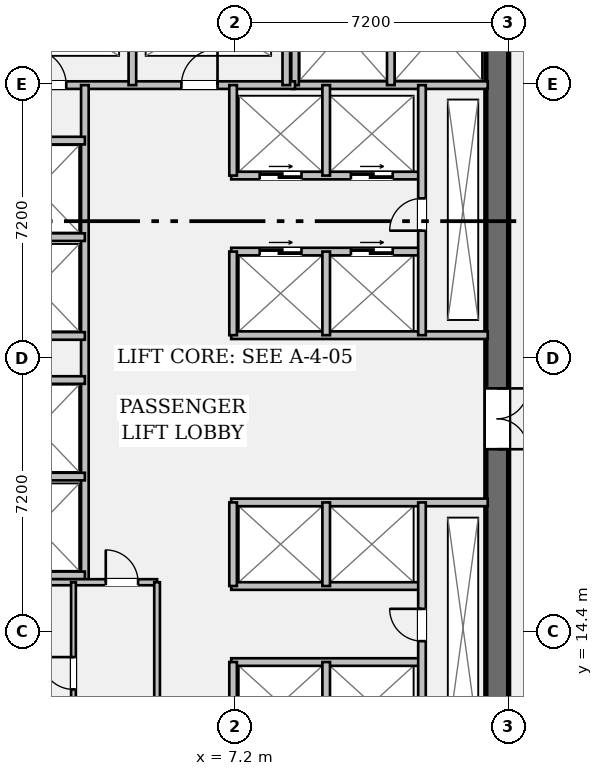
"""IFC4 building model, lengths in metres.
Left out: names, types, materials, properties, quantities, classifications, styles, units other than length and angle.
Written with IfcOpenShell. Run it as: python <this file> out.ifc"""

import sys

from ifc_helpers import new_model, si_unit, direction, frame, frame_2d, origin, place, context, subcontext, project, spatial, rectangle, extrude, element, fill, save


model = new_model("IFC4")
c1 = context("Model", 3, precision=1e-05, world=origin(), true_north=direction((0.0, 1.0)))
c2 = subcontext(c1, "Body", "Model", "MODEL_VIEW")
j1 = project(units=[si_unit("LENGTHUNIT", "METRE"), si_unit("PLANEANGLEUNIT", "RADIAN")], contexts=[c1])
p1 = place(None, origin())
s1 = spatial("IfcSite", under=j1, at=p1, CompositionType="ELEMENT")
p2 = place(p1, origin())
s2 = spatial("IfcBuilding", under=s1, at=p2, CompositionType="ELEMENT")
p3 = place(p2, frame((0.0, 0.0, 92.75)))
s3 = spatial("IfcBuildingStorey", under=s2, at=p3, CompositionType="ELEMENT", Elevation=92.75)
p4 = place(p3, frame((14.1, 35.4, 0.0), z_axis=(0.0, 0.0, 1.0), x_axis=(0.0, -1.0, 0.0)))
e1 = element("IfcWall", 1, at=p4, inside=s3, PredefinedType="SHEAR", context=c2, shape_type="SweptSolid", body=[
    extrude(rectangle(XDim=27.6, YDim=0.6, at=frame_2d((13.8, 0.0))), origin(), (0.0, 0.0, 1.0), 4.6),
])
p5 = place(p4, frame((1.3, 0.0, 0.0)))
e2 = element("IfcOpeningElement", 2, at=p5, cuts=e1, PredefinedType="OPENING", context=c2, shape_type="SweptSolid", body=[
    extrude(rectangle(XDim=1.2, YDim=2.15, at=frame_2d((0.6, 1.075))), frame((0.0, 0.312, 0.0), z_axis=(0.0, -1.0, 0.0), x_axis=(1.0, 0.0, 0.0)), (0.0, 0.0, 1.0), 0.624),
])
p6 = place(p4, frame((25.25, 0.0, 0.0)))
e3 = element("IfcOpeningElement", 3, at=p6, cuts=e1, PredefinedType="OPENING", context=c2, shape_type="SweptSolid", body=[
    extrude(rectangle(XDim=1.2, YDim=2.15, at=frame_2d((0.6, 1.075))), frame((0.0, 0.312, 0.0), z_axis=(0.0, -1.0, 0.0), x_axis=(1.0, 0.0, 0.0)), (0.0, 0.0, 1.0), 0.624),
])
p7 = place(p4, frame((14.6, 0.0, 0.0)))
e4 = element("IfcOpeningElement", 4, at=p7, cuts=e1, PredefinedType="OPENING", context=c2, shape_type="SweptSolid", body=[
    extrude(rectangle(XDim=1.6, YDim=2.2, at=frame_2d((0.8, 1.1))), frame((0.0, 0.312, 0.0), z_axis=(0.0, -1.0, 0.0), x_axis=(1.0, 0.0, 0.0)), (0.0, 0.0, 1.0), 0.624),
])
p8 = place(p3, frame((8.7, 28.78, 0.0), z_axis=(0.0, 0.0, 1.0), x_axis=(1.0, 0.0, 0.0)))
e5 = element("IfcWall", 5, at=p8, inside=s3, PredefinedType="PARTITIONING", context=c2, shape_type="SweptSolid", body=[
    extrude(rectangle(XDim=5.15, YDim=0.2, at=frame_2d((2.575, 0.0))), origin(), (0.0, 0.0, 1.0), 4.6),
])
for number, where, z_axis, x_axis in (
    (6, (8.78, 28.78, 0.0), (0.0, 0.0, 1.0), (0.0, 1.0, 0.0)),
    (7, (11.3, 28.78, 0.0), (0.0, 0.0, 1.0), (0.0, 1.0, 0.0)),
):
    element("IfcWall", number, at=place(p3, frame(where, z_axis=z_axis, x_axis=x_axis)), inside=s3, PredefinedType="PARTITIONING", context=c2, shape_type="SweptSolid", body=[
        extrude(rectangle(XDim=3.1, YDim=0.2, at=frame_2d((1.55, 0.0))), origin(), (0.0, 0.0, 1.0), 4.6),
    ])
p9 = place(p3, frame((0.6, 28.78, 0.0), z_axis=(0.0, 0.0, 1.0), x_axis=(1.0, 0.0, 0.0)))
e8 = element("IfcWall", 8, at=p9, inside=s3, PredefinedType="PARTITIONING", context=c2, shape_type="SweptSolid", body=[
    extrude(rectangle(XDim=8.18, YDim=0.2, at=frame_2d((4.09, 0.0))), origin(), (0.0, 0.0, 1.0), 4.6),
])
p10 = place(p9, frame((1.21, 0.0, 0.0)))
e9 = element("IfcOpeningElement", 9, at=p10, cuts=e8, PredefinedType="OPENING", context=c2, shape_type="SweptSolid", body=[
    extrude(rectangle(XDim=0.95, YDim=2.15, at=frame_2d((0.475, 1.075))), frame((0.0, 0.112, 0.0), z_axis=(0.0, -1.0, 0.0), x_axis=(1.0, 0.0, 0.0)), (0.0, 0.0, 1.0), 0.224),
])
p11 = place(p9, frame((5.19, 0.0, 0.0)))
e10 = element("IfcOpeningElement", 10, at=p11, cuts=e8, PredefinedType="OPENING", context=c2, shape_type="SweptSolid", body=[
    extrude(rectangle(XDim=0.95, YDim=2.15, at=frame_2d((0.475, 1.075))), frame((0.0, 0.112, 0.0), z_axis=(0.0, -1.0, 0.0), x_axis=(1.0, 0.0, 0.0)), (0.0, 0.0, 1.0), 0.224),
])
for number, where, z_axis, x_axis in (
    (11, (4.5, 28.78, 0.0), (0.0, 0.0, 1.0), (0.0, 1.0, 0.0)),
    (12, (8.55, 28.78, 0.0), (0.0, 0.0, 1.0), (0.0, 1.0, 0.0)),
):
    element("IfcWall", number, at=place(p3, frame(where, z_axis=z_axis, x_axis=x_axis)), inside=s3, PredefinedType="PARTITIONING", context=c2, shape_type="SweptSolid", body=[
        extrude(rectangle(XDim=2.94, YDim=0.2, at=frame_2d((1.47, 0.0))), origin(), (0.0, 0.0, 1.0), 4.6),
    ])
p12 = place(p3, frame((3.25, 15.7, 0.0), z_axis=(0.0, 0.0, 1.0), x_axis=(0.0, 1.0, 0.0)))
e13 = element("IfcWall", 13, at=p12, inside=s3, PredefinedType="PARTITIONING", context=c2, shape_type="SweptSolid", body=[
    extrude(rectangle(XDim=13.08, YDim=0.2, at=frame_2d((6.54, 0.0))), origin(), (0.0, 0.0, 1.0), 4.6),
])
for number, where, z_axis, x_axis in (
    (14, (0.6, 15.88, 0.0), (0.0, 0.0, 1.0), (1.0, 0.0, 0.0)),
    (15, (0.6, 18.48, 0.0), (0.0, 0.0, 1.0), (1.0, 0.0, 0.0)),
    (16, (0.6, 22.18, 0.0), (0.0, 0.0, 1.0), (1.0, 0.0, 0.0)),
    (17, (0.6, 24.78, 0.0), (0.0, 0.0, 1.0), (1.0, 0.0, 0.0)),
    (18, (0.6, 21.02, 0.0), (0.0, 0.0, 1.0), (1.0, 0.0, 0.0)),
    (19, (0.6, 27.32, 0.0), (0.0, 0.0, 1.0), (1.0, 0.0, 0.0)),
):
    element("IfcWall", number, at=place(p3, frame(where, z_axis=z_axis, x_axis=x_axis)), inside=s3, PredefinedType="PARTITIONING", context=c2, shape_type="SweptSolid", body=[
        extrude(rectangle(XDim=2.65, YDim=0.2, at=frame_2d((1.325, 0.0))), origin(), (0.0, 0.0, 1.0), 4.6),
    ])
p13 = place(p3, frame((7.1, 22.2, 0.0), z_axis=(0.0, 0.0, 1.0), x_axis=(1.0, 0.0, 0.0)))
e20 = element("IfcWall", 20, at=p13, inside=s3, PredefinedType="PARTITIONING", context=c2, shape_type="SweptSolid", body=[
    extrude(rectangle(XDim=6.75, YDim=0.2, at=frame_2d((3.375, 0.0))), origin(), (0.0, 0.0, 1.0), 4.6),
])
p14 = place(p3, frame((7.1, 24.4, 0.0), z_axis=(0.0, 0.0, 1.0), x_axis=(1.0, 0.0, 0.0)))
e21 = element("IfcWall", 21, at=p14, inside=s3, PredefinedType="PARTITIONING", context=c2, shape_type="SweptSolid", body=[
    extrude(rectangle(XDim=5.02, YDim=0.2, at=frame_2d((2.51, 0.0))), origin(), (0.0, 0.0, 1.0), 4.6),
])
p15 = place(p14, frame((0.75, 0.0, 0.0)))
e22 = element("IfcOpeningElement", 22, at=p15, cuts=e21, PredefinedType="OPENING", context=c2, shape_type="SweptSolid", body=[
    extrude(rectangle(XDim=1.1, YDim=2.2, at=frame_2d((0.55, 1.1))), frame((0.0, 0.112, 0.0), z_axis=(0.0, -1.0, 0.0), x_axis=(1.0, 0.0, 0.0)), (0.0, 0.0, 1.0), 0.224),
])
p16 = place(p14, frame((3.15, 0.0, 0.0)))
e23 = element("IfcOpeningElement", 23, at=p16, cuts=e21, PredefinedType="OPENING", context=c2, shape_type="SweptSolid", body=[
    extrude(rectangle(XDim=1.1, YDim=2.2, at=frame_2d((0.55, 1.1))), frame((0.0, 0.112, 0.0), z_axis=(0.0, -1.0, 0.0), x_axis=(1.0, 0.0, 0.0)), (0.0, 0.0, 1.0), 0.224),
])
p17 = place(p3, frame((7.1, 26.4, 0.0), z_axis=(0.0, 0.0, 1.0), x_axis=(1.0, 0.0, 0.0)))
e24 = element("IfcWall", 24, at=p17, inside=s3, PredefinedType="PARTITIONING", context=c2, shape_type="SweptSolid", body=[
    extrude(rectangle(XDim=5.02, YDim=0.2, at=frame_2d((2.51, 0.0))), origin(), (0.0, 0.0, 1.0), 4.6),
])
p18 = place(p17, frame((0.75, 0.0, 0.0)))
e25 = element("IfcOpeningElement", 25, at=p18, cuts=e24, PredefinedType="OPENING", context=c2, shape_type="SweptSolid", body=[
    extrude(rectangle(XDim=1.1, YDim=2.2, at=frame_2d((0.55, 1.1))), frame((0.0, 0.112, 0.0), z_axis=(0.0, -1.0, 0.0), x_axis=(1.0, 0.0, 0.0)), (0.0, 0.0, 1.0), 0.224),
])
p19 = place(p17, frame((3.15, 0.0, 0.0)))
e26 = element("IfcOpeningElement", 26, at=p19, cuts=e24, PredefinedType="OPENING", context=c2, shape_type="SweptSolid", body=[
    extrude(rectangle(XDim=1.1, YDim=2.2, at=frame_2d((0.55, 1.1))), frame((0.0, 0.112, 0.0), z_axis=(0.0, -1.0, 0.0), x_axis=(1.0, 0.0, 0.0)), (0.0, 0.0, 1.0), 0.224),
])
p20 = place(p3, frame((7.15, 22.2, 0.0), z_axis=(0.0, 0.0, 1.0), x_axis=(0.0, 1.0, 0.0)))
e27 = element("IfcWall", 27, at=p20, inside=s3, PredefinedType="PARTITIONING", context=c2, shape_type="SweptSolid", body=[
    extrude(rectangle(XDim=2.2, YDim=0.2, at=frame_2d((1.1, 0.0))), origin(), (0.0, 0.0, 1.0), 4.6),
])
p21 = place(p3, frame((7.15, 26.4, 0.0), z_axis=(0.0, 0.0, 1.0), x_axis=(0.0, 1.0, 0.0)))
e28 = element("IfcWall", 28, at=p21, inside=s3, PredefinedType="PARTITIONING", context=c2, shape_type="SweptSolid", body=[
    extrude(rectangle(XDim=2.38, YDim=0.2, at=frame_2d((1.19, 0.0))), origin(), (0.0, 0.0, 1.0), 4.6),
])
p22 = place(p3, frame((9.6, 22.2, 0.0), z_axis=(0.0, 0.0, 1.0), x_axis=(0.0, 1.0, 0.0)))
e29 = element("IfcWall", 29, at=p22, inside=s3, PredefinedType="PARTITIONING", context=c2, shape_type="SweptSolid", body=[
    extrude(rectangle(XDim=2.2, YDim=0.2, at=frame_2d((1.1, 0.0))), origin(), (0.0, 0.0, 1.0), 4.6),
])
p23 = place(p3, frame((9.6, 26.4, 0.0), z_axis=(0.0, 0.0, 1.0), x_axis=(0.0, 1.0, 0.0)))
e30 = element("IfcWall", 30, at=p23, inside=s3, PredefinedType="PARTITIONING", context=c2, shape_type="SweptSolid", body=[
    extrude(rectangle(XDim=2.38, YDim=0.2, at=frame_2d((1.19, 0.0))), origin(), (0.0, 0.0, 1.0), 4.6),
])
p24 = place(p3, frame((12.12, 22.2, 0.0), z_axis=(0.0, 0.0, 1.0), x_axis=(0.0, 1.0, 0.0)))
e31 = element("IfcWall", 31, at=p24, inside=s3, PredefinedType="PARTITIONING", context=c2, shape_type="SweptSolid", body=[
    extrude(rectangle(XDim=6.58, YDim=0.2, at=frame_2d((3.29, 0.0))), origin(), (0.0, 0.0, 1.0), 4.6),
])
p25 = place(p24, frame((2.75, 0.0, 0.0)))
e32 = element("IfcOpeningElement", 32, at=p25, cuts=e31, PredefinedType="OPENING", context=c2, shape_type="SweptSolid", body=[
    extrude(rectangle(XDim=0.85, YDim=2.15, at=frame_2d((0.425, 1.075))), frame((0.0, 0.112, 0.0), z_axis=(0.0, -1.0, 0.0), x_axis=(1.0, 0.0, 0.0)), (0.0, 0.0, 1.0), 0.224),
])
p26 = place(p3, frame((7.1, 17.8, 0.0), z_axis=(0.0, 0.0, 1.0), x_axis=(1.0, 0.0, 0.0)))
e33 = element("IfcWall", 33, at=p26, inside=s3, PredefinedType="PARTITIONING", context=c2, shape_type="SweptSolid", body=[
    extrude(rectangle(XDim=6.75, YDim=0.2, at=frame_2d((3.375, 0.0))), origin(), (0.0, 0.0, 1.0), 4.6),
])
for number, where, z_axis, x_axis in (
    (34, (7.1, 15.6, 0.0), (0.0, 0.0, 1.0), (1.0, 0.0, 0.0)),
    (35, (7.1, 13.6, 0.0), (0.0, 0.0, 1.0), (1.0, 0.0, 0.0)),
):
    element("IfcWall", number, at=place(p3, frame(where, z_axis=z_axis, x_axis=x_axis)), inside=s3, PredefinedType="PARTITIONING", context=c2, shape_type="SweptSolid", body=[
        extrude(rectangle(XDim=5.02, YDim=0.2, at=frame_2d((2.51, 0.0))), origin(), (0.0, 0.0, 1.0), 4.6),
    ])
p27 = place(p3, frame((7.15, 15.6, 0.0), z_axis=(0.0, 0.0, 1.0), x_axis=(0.0, 1.0, 0.0)))
e36 = element("IfcWall", 36, at=p27, inside=s3, PredefinedType="PARTITIONING", context=c2, shape_type="SweptSolid", body=[
    extrude(rectangle(XDim=2.2, YDim=0.2, at=frame_2d((1.1, 0.0))), origin(), (0.0, 0.0, 1.0), 4.6),
])
p28 = place(p3, frame((7.15, 11.2, 0.0), z_axis=(0.0, 0.0, 1.0), x_axis=(0.0, 1.0, 0.0)))
e37 = element("IfcWall", 37, at=p28, inside=s3, PredefinedType="PARTITIONING", context=c2, shape_type="SweptSolid", body=[
    extrude(rectangle(XDim=2.4, YDim=0.2, at=frame_2d((1.2, 0.0))), origin(), (0.0, 0.0, 1.0), 4.6),
])
p29 = place(p3, frame((9.6, 15.6, 0.0), z_axis=(0.0, 0.0, 1.0), x_axis=(0.0, 1.0, 0.0)))
e38 = element("IfcWall", 38, at=p29, inside=s3, PredefinedType="PARTITIONING", context=c2, shape_type="SweptSolid", body=[
    extrude(rectangle(XDim=2.2, YDim=0.2, at=frame_2d((1.1, 0.0))), origin(), (0.0, 0.0, 1.0), 4.6),
])
p30 = place(p3, frame((9.6, 11.2, 0.0), z_axis=(0.0, 0.0, 1.0), x_axis=(0.0, 1.0, 0.0)))
e39 = element("IfcWall", 39, at=p30, inside=s3, PredefinedType="PARTITIONING", context=c2, shape_type="SweptSolid", body=[
    extrude(rectangle(XDim=2.4, YDim=0.2, at=frame_2d((1.2, 0.0))), origin(), (0.0, 0.0, 1.0), 4.6),
])
p31 = place(p3, frame((12.12, 11.2, 0.0), z_axis=(0.0, 0.0, 1.0), x_axis=(0.0, 1.0, 0.0)))
e40 = element("IfcWall", 40, at=p31, inside=s3, PredefinedType="PARTITIONING", context=c2, shape_type="SweptSolid", body=[
    extrude(rectangle(XDim=6.6, YDim=0.2, at=frame_2d((3.3, 0.0))), origin(), (0.0, 0.0, 1.0), 4.6),
])
p32 = place(p31, frame((2.95, 0.0, 0.0)))
e41 = element("IfcOpeningElement", 41, at=p32, cuts=e40, PredefinedType="OPENING", context=c2, shape_type="SweptSolid", body=[
    extrude(rectangle(XDim=0.85, YDim=2.15, at=frame_2d((0.425, 1.075))), frame((0.0, 0.112, 0.0), z_axis=(0.0, -1.0, 0.0), x_axis=(1.0, 0.0, 0.0)), (0.0, 0.0, 1.0), 0.224),
])
p33 = place(p3, frame((0.6, 15.7, 0.0), z_axis=(0.0, 0.0, 1.0), x_axis=(1.0, 0.0, 0.0)))
e42 = element("IfcWall", 42, at=p33, inside=s3, PredefinedType="PARTITIONING", context=c2, shape_type="SweptSolid", body=[
    extrude(rectangle(XDim=4.55, YDim=0.16, at=frame_2d((2.275, 0.0))), origin(), (0.0, 0.0, 1.0), 4.6),
])
p34 = place(p33, frame((3.2, 0.0, 0.0)))
e43 = element("IfcOpeningElement", 43, at=p34, cuts=e42, PredefinedType="OPENING", context=c2, shape_type="SweptSolid", body=[
    extrude(rectangle(XDim=0.85, YDim=2.15, at=frame_2d((0.425, 1.075))), frame((0.0, 0.092, 0.0), z_axis=(0.0, -1.0, 0.0), x_axis=(1.0, 0.0, 0.0)), (0.0, 0.0, 1.0), 0.184),
])
p35 = place(p3, frame((5.15, 11.28, 0.0), z_axis=(0.0, 0.0, 1.0), x_axis=(0.0, 1.0, 0.0)))
e44 = element("IfcWall", 44, at=p35, inside=s3, PredefinedType="PARTITIONING", context=c2, shape_type="SweptSolid", body=[
    extrude(rectangle(XDim=4.42, YDim=0.15, at=frame_2d((2.21, 0.0))), origin(), (0.0, 0.0, 1.0), 4.6),
])
p36 = place(p3, frame((2.95, 11.28, 0.0), z_axis=(0.0, 0.0, 1.0), x_axis=(0.0, 1.0, 0.0)))
e45 = element("IfcWall", 45, at=p36, inside=s3, PredefinedType="PARTITIONING", context=c2, shape_type="SweptSolid", body=[
    extrude(rectangle(XDim=4.42, YDim=0.125, at=frame_2d((2.21, 0.0))), origin(), (0.0, 0.0, 1.0), 4.6),
])
p37 = place(p36, frame((1.6, 0.0, 0.0)))
e46 = element("IfcOpeningElement", 46, at=p37, cuts=e45, PredefinedType="OPENING", context=c2, shape_type="SweptSolid", body=[
    extrude(rectangle(XDim=0.85, YDim=2.15, at=frame_2d((0.425, 1.075))), frame((0.0, 0.074, 0.0), z_axis=(0.0, -1.0, 0.0), x_axis=(1.0, 0.0, 0.0)), (0.0, 0.0, 1.0), 0.149),
])
p38 = place(p10, origin())
e47 = element("IfcDoor", 47, at=p38, inside=s3, OperationType="SINGLE_SWING_LEFT", PredefinedType="DOOR", context=c2, shape_type="SweptSolid", body=[
    extrude(rectangle(XDim=0.95, YDim=2.15, at=frame_2d((0.475, 1.075))), frame((0.0, 0.025, 0.0), z_axis=(0.0, -1.0, 0.0), x_axis=(1.0, 0.0, 0.0)), (0.0, 0.0, 1.0), 0.05),
])
fill(e9, e47)
p39 = place(p11, origin())
e48 = element("IfcDoor", 48, at=p39, inside=s3, OperationType="SINGLE_SWING_RIGHT", PredefinedType="DOOR", context=c2, shape_type="SweptSolid", body=[
    extrude(rectangle(XDim=0.95, YDim=2.15, at=frame_2d((0.475, 1.075))), frame((0.0, 0.025, 0.0), z_axis=(0.0, -1.0, 0.0), x_axis=(1.0, 0.0, 0.0)), (0.0, 0.0, 1.0), 0.05),
])
fill(e10, e48)
p40 = place(p7, origin())
e49 = element("IfcDoor", 49, at=p40, inside=s3, OperationType="DOUBLE_DOOR_SINGLE_SWING", PredefinedType="DOOR", context=c2, shape_type="SweptSolid", body=[
    extrude(rectangle(XDim=1.6, YDim=2.2, at=frame_2d((0.8, 1.1))), frame((0.0, 0.025, 0.0), z_axis=(0.0, -1.0, 0.0), x_axis=(1.0, 0.0, 0.0)), (0.0, 0.0, 1.0), 0.05),
])
fill(e4, e49)
p41 = place(p25, origin())
e50 = element("IfcDoor", 50, at=p41, inside=s3, OperationType="SINGLE_SWING_LEFT", PredefinedType="DOOR", context=c2, shape_type="SweptSolid", body=[
    extrude(rectangle(XDim=0.85, YDim=2.15, at=frame_2d((0.425, 1.075))), frame((0.0, 0.025, 0.0), z_axis=(0.0, -1.0, 0.0), x_axis=(1.0, 0.0, 0.0)), (0.0, 0.0, 1.0), 0.05),
])
fill(e32, e50)
p42 = place(p15, origin())
e51 = element("IfcDoor", 51, at=p42, inside=s3, OperationType="DOUBLE_DOOR_SLIDING", PredefinedType="DOOR", context=c2, shape_type="SweptSolid", body=[
    extrude(rectangle(XDim=1.1, YDim=2.2, at=frame_2d((0.55, 1.1))), frame((0.0, 0.025, 0.0), z_axis=(0.0, -1.0, 0.0), x_axis=(1.0, 0.0, 0.0)), (0.0, 0.0, 1.0), 0.05),
])
fill(e22, e51)
p43 = place(p16, origin())
e52 = element("IfcDoor", 52, at=p43, inside=s3, OperationType="DOUBLE_DOOR_SLIDING", PredefinedType="DOOR", context=c2, shape_type="SweptSolid", body=[
    extrude(rectangle(XDim=1.1, YDim=2.2, at=frame_2d((0.55, 1.1))), frame((0.0, 0.025, 0.0), z_axis=(0.0, -1.0, 0.0), x_axis=(1.0, 0.0, 0.0)), (0.0, 0.0, 1.0), 0.05),
])
fill(e23, e52)
p44 = place(p18, origin())
e53 = element("IfcDoor", 53, at=p44, inside=s3, OperationType="DOUBLE_DOOR_SLIDING", PredefinedType="DOOR", context=c2, shape_type="SweptSolid", body=[
    extrude(rectangle(XDim=1.1, YDim=2.2, at=frame_2d((0.55, 1.1))), frame((0.0, 0.025, 0.0), z_axis=(0.0, -1.0, 0.0), x_axis=(1.0, 0.0, 0.0)), (0.0, 0.0, 1.0), 0.05),
])
fill(e25, e53)
p45 = place(p19, origin())
e54 = element("IfcDoor", 54, at=p45, inside=s3, OperationType="DOUBLE_DOOR_SLIDING", PredefinedType="DOOR", context=c2, shape_type="SweptSolid", body=[
    extrude(rectangle(XDim=1.1, YDim=2.2, at=frame_2d((0.55, 1.1))), frame((0.0, 0.025, 0.0), z_axis=(0.0, -1.0, 0.0), x_axis=(1.0, 0.0, 0.0)), (0.0, 0.0, 1.0), 0.05),
])
fill(e26, e54)
p46 = place(p32, origin())
e55 = element("IfcDoor", 55, at=p46, inside=s3, OperationType="SINGLE_SWING_RIGHT", PredefinedType="DOOR", context=c2, shape_type="SweptSolid", body=[
    extrude(rectangle(XDim=0.85, YDim=2.15, at=frame_2d((0.425, 1.075))), frame((0.0, 0.025, 0.0), z_axis=(0.0, -1.0, 0.0), x_axis=(1.0, 0.0, 0.0)), (0.0, 0.0, 1.0), 0.05),
])
fill(e41, e55)
p47 = place(p34, origin())
e56 = element("IfcDoor", 56, at=p47, inside=s3, OperationType="SINGLE_SWING_LEFT", PredefinedType="DOOR", context=c2, shape_type="SweptSolid", body=[
    extrude(rectangle(XDim=0.85, YDim=2.15, at=frame_2d((0.425, 1.075))), frame((0.0, 0.025, 0.0), z_axis=(0.0, -1.0, 0.0), x_axis=(1.0, 0.0, 0.0)), (0.0, 0.0, 1.0), 0.05),
])
fill(e43, e56)
p48 = place(p37, origin())
e57 = element("IfcDoor", 57, at=p48, inside=s3, OperationType="SINGLE_SWING_RIGHT", PredefinedType="DOOR", context=c2, shape_type="SweptSolid", body=[
    extrude(rectangle(XDim=0.85, YDim=2.15, at=frame_2d((0.425, 1.075))), frame((0.0, 0.025, 0.0), z_axis=(0.0, -1.0, 0.0), x_axis=(1.0, 0.0, 0.0)), (0.0, 0.0, 1.0), 0.05),
])
fill(e46, e57)
save(model, sys.argv[1])
